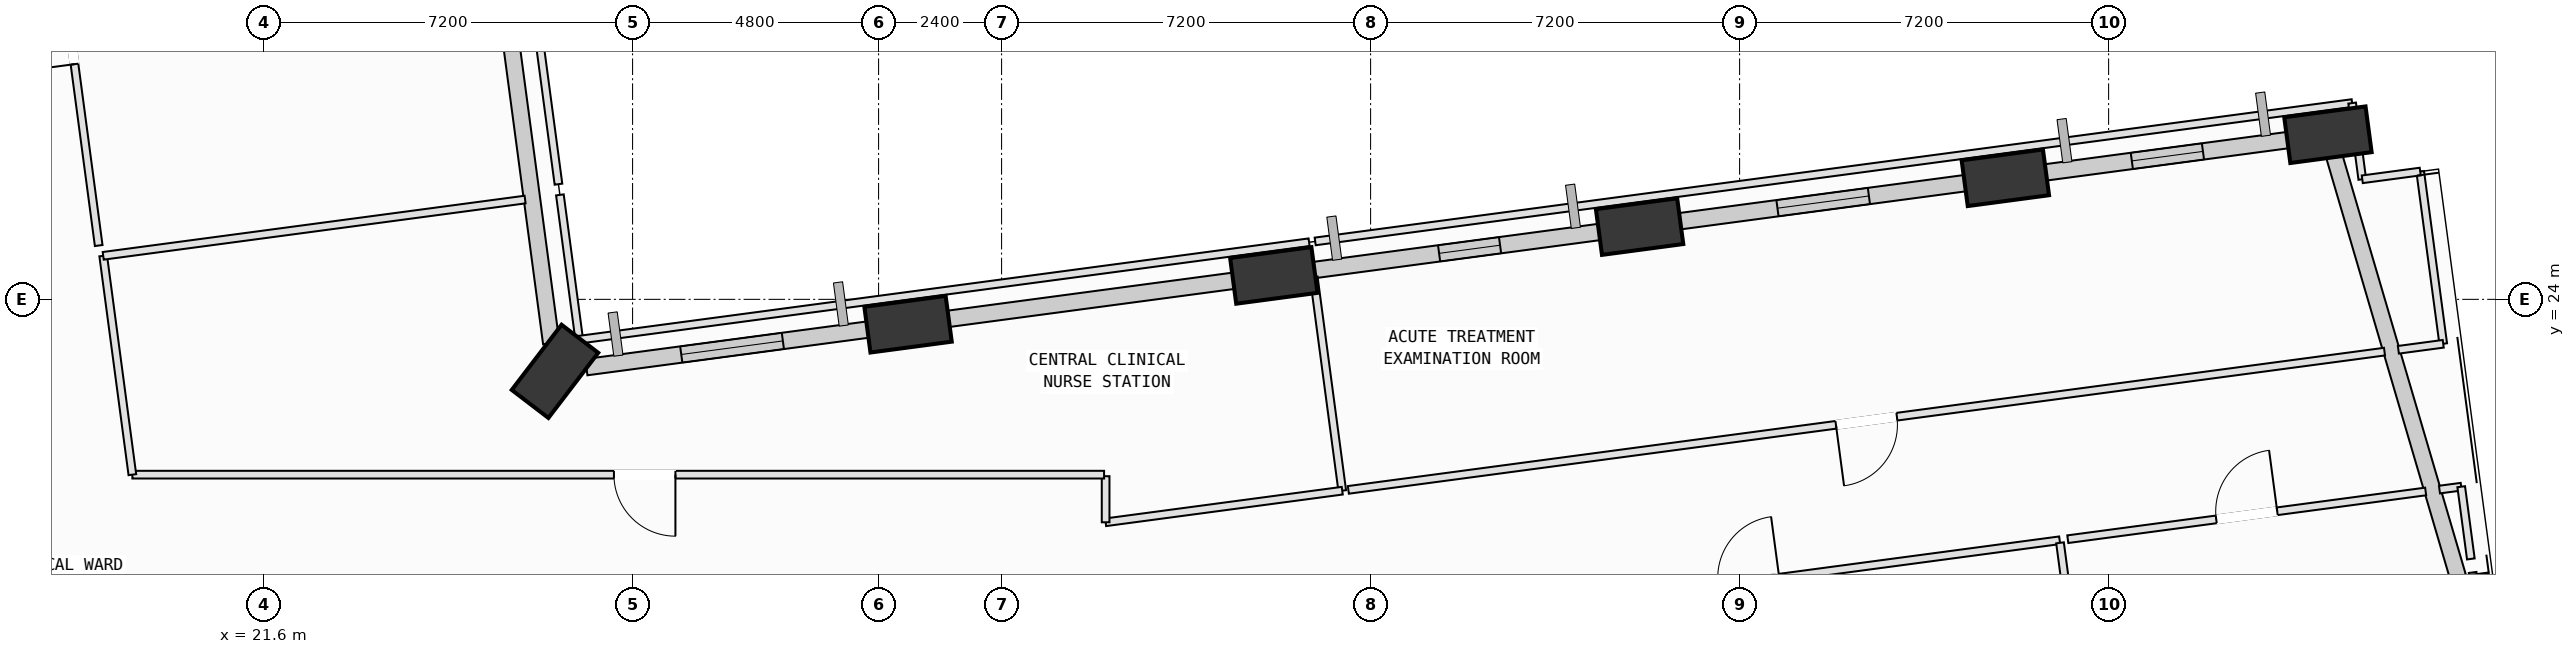
"""IFC4 building model, lengths in metres.
Left out: names, types, materials, properties, quantities, classifications, styles, units other than length and angle.
Written with IfcOpenShell. Run it as: python <this file> out.ifc"""

import sys

from ifc_helpers import new_model, si_unit, direction, frame, frame_2d, origin, origin_2d, place, context, subcontext, project, spatial, rectangle, extrude, element, fill, save


model = new_model("IFC4")
c1 = context("Model", 3, precision=1e-05, world=origin(), true_north=direction((0.0, 1.0)))
c2 = subcontext(c1, "Body", "Model", "MODEL_VIEW")
j1 = project(units=[si_unit("LENGTHUNIT", "METRE"), si_unit("PLANEANGLEUNIT", "RADIAN")], contexts=[c1])
p1 = place(None, origin())
s1 = spatial("IfcSite", under=j1, at=p1, CompositionType="ELEMENT")
p2 = place(p1, origin())
s2 = spatial("IfcBuilding", under=s1, at=p2, CompositionType="ELEMENT")
p3 = place(p2, frame((0.0, 0.0, 55.0)))
s3 = spatial("IfcBuildingStorey", under=s2, at=p3, CompositionType="ELEMENT", Elevation=55.0)
p4 = place(p3, frame((64.649, 17.795, 0.002), z_axis=(0.027737563791, 0.127847155378, 0.991405937251), x_axis=(-0.079107913013, -0.988396190327, 0.129672314108)))
e1 = element("IfcColumn", 1, at=p4, inside=s3, PredefinedType="COLUMN", context=c2, shape_type="SweptSolid", body=[
    extrude(rectangle(XDim=1.6, YDim=0.9, at=origin_2d()), origin(), (0.0, 0.0, 1.0), 4.031),
])
p5 = place(p3, frame((61.879, 27.211, 0.002), z_axis=(-0.01085970606, 0.11636266046, 0.993147420092), x_axis=(-0.974721493015, -0.222888100092, 0.015456580863)))
e2 = element("IfcColumn", 2, at=p5, inside=s3, PredefinedType="COLUMN", context=c2, shape_type="SweptSolid", body=[
    extrude(rectangle(XDim=1.6, YDim=0.9, at=origin_2d()), origin(), (0.0, 0.0, 1.0), 4.024),
])
p6 = place(p3, frame((55.585, 26.372, 0.002), z_axis=(-0.007239239153, 0.090703408213, 0.995851638124), x_axis=(-0.977594963145, -0.21015057651, 0.012034252227)))
e3 = element("IfcColumn", 3, at=p6, inside=s3, PredefinedType="COLUMN", context=c2, shape_type="SweptSolid", body=[
    extrude(rectangle(XDim=1.6, YDim=0.9, at=origin_2d()), origin(), (0.0, 0.0, 1.0), 4.013),
])
p7 = place(p3, frame((48.448, 25.419, 0.002), z_axis=(-0.003048590926, 0.061398621247, 0.998108669135), x_axis=(-0.98344957441, -0.180999535302, 0.008130363673)))
e4 = element("IfcColumn", 4, at=p7, inside=s3, PredefinedType="COLUMN", context=c2, shape_type="SweptSolid", body=[
    extrude(rectangle(XDim=1.6, YDim=0.9, at=origin_2d()), origin(), (0.0, 0.0, 1.0), 4.004),
])
p8 = place(p3, frame((41.312, 24.467, 0.002), z_axis=(0.001099008832, 0.03199336823, 0.999487476945), x_axis=(-0.995169392808, -0.098081366019, 0.004233823144)))
e5 = element("IfcColumn", 5, at=p8, inside=s3, PredefinedType="COLUMN", context=c2, shape_type="SweptSolid", body=[
    extrude(rectangle(XDim=1.6, YDim=0.9, at=origin_2d()), origin(), (0.0, 0.0, 1.0), 3.999),
])
p9 = place(p3, frame((34.175, 23.515, 0.002), z_axis=(0.005314508959, 0.002443452395, 0.999982892621), x_axis=(-0.534225748842, 0.845341499516, 0.000773609051)))
e6 = element("IfcColumn", 6, at=p9, inside=s3, PredefinedType="COLUMN", context=c2, shape_type="SweptSolid", body=[
    extrude(rectangle(XDim=1.6, YDim=0.9, at=origin_2d()), origin(), (0.0, 0.0, 1.0), 3.997),
])
p10 = place(p3, frame((27.286, 22.595, 0.002), z_axis=(0.009342779553, -0.026074293262, 0.999616348256), x_axis=(0.303914659334, 0.952445133146, 0.022003367683)))
e7 = element("IfcColumn", 7, at=p10, inside=s3, PredefinedType="COLUMN", context=c2, shape_type="SweptSolid", body=[
    extrude(rectangle(XDim=1.6, YDim=0.9, at=origin_2d()), origin(), (0.0, 0.0, 1.0), 3.998),
])
p11 = place(p3, frame((61.985, 26.851, 0.0), z_axis=(0.0, 0.0, 1.0), x_axis=(0.282177065207, -0.959362342325, 0.0)))
e8 = element("IfcWall", 8, at=p11, inside=s3, PredefinedType="SOLIDWALL", context=c2, shape_type="SweptSolid", body=[
    extrude(rectangle(XDim=8.614, YDim=0.32, at=frame_2d((4.307, 0.0))), origin(), (0.0, 0.0, 1.0), 3.165),
])
p12 = place(p3, frame((56.17, 26.449, 0.0), z_axis=(0.0, 0.0, 1.0), x_axis=(0.991214797288, 0.132261958388, 0.0)))
e9 = element("IfcWall", 9, at=p12, inside=s3, PredefinedType="SOLIDWALL", context=c2, shape_type="SweptSolid", body=[
    extrude(rectangle(XDim=5.209, YDim=0.32, at=frame_2d((2.604, 0.0))), origin(), (0.0, 0.0, 1.0), 3.165),
])
p13 = place(p12, frame((1.9, 0.0, 0.75)))
e10 = element("IfcOpeningElement", 10, at=p13, cuts=e9, PredefinedType="OPENING", context=c2, shape_type="SweptSolid", body=[
    extrude(rectangle(XDim=1.4, YDim=1.85, at=frame_2d((0.7, 0.925))), frame((0.0, 0.17, 0.0), z_axis=(0.0, -1.0, 0.0), x_axis=(1.0, 0.0, 0.0)), (0.0, 0.0, 1.0), 0.34),
])
p14 = place(p3, frame((49.049, 25.499, 0.0), z_axis=(0.0, 0.0, 1.0), x_axis=(0.991213029166, 0.132275208602, 0.0)))
e11 = element("IfcWall", 11, at=p14, inside=s3, PredefinedType="SOLIDWALL", context=c2, shape_type="SweptSolid", body=[
    extrude(rectangle(XDim=6.024, YDim=0.32, at=frame_2d((3.012, 0.0))), origin(), (0.0, 0.0, 1.0), 3.165),
])
p15 = place(p14, frame((2.109, 0.0, 0.75)))
e12 = element("IfcOpeningElement", 12, at=p15, cuts=e11, PredefinedType="OPENING", context=c2, shape_type="SweptSolid", body=[
    extrude(rectangle(XDim=1.8, YDim=2.05, at=frame_2d((0.9, 1.025))), frame((0.0, 0.17, 0.0), z_axis=(0.0, -1.0, 0.0), x_axis=(1.0, 0.0, 0.0)), (0.0, 0.0, 1.0), 0.34),
])
p16 = place(p3, frame((41.922, 24.548, 0.0), z_axis=(0.0, 0.0, 1.0), x_axis=(0.991215812837, 0.132254347308, 0.0)))
e13 = element("IfcWall", 13, at=p16, inside=s3, PredefinedType="SOLIDWALL", context=c2, shape_type="SweptSolid", body=[
    extrude(rectangle(XDim=6.0, YDim=0.32, at=frame_2d((3.0, 0.0))), origin(), (0.0, 0.0, 1.0), 3.165),
])
p17 = place(p16, frame((2.638, 0.0, 0.75)))
e14 = element("IfcOpeningElement", 14, at=p17, cuts=e13, PredefinedType="OPENING", context=c2, shape_type="SweptSolid", body=[
    extrude(rectangle(XDim=1.2, YDim=1.75, at=frame_2d((0.6, 0.875))), frame((0.0, 0.17, 0.0), z_axis=(0.0, -1.0, 0.0), x_axis=(1.0, 0.0, 0.0)), (0.0, 0.0, 1.0), 0.34),
])
p18 = place(p3, frame((34.789, 23.597, 0.0), z_axis=(0.0, 0.0, 1.0), x_axis=(0.99121756975, 0.132241178982, 0.0)))
e15 = element("IfcWall", 15, at=p18, inside=s3, PredefinedType="SOLIDWALL", context=c2, shape_type="SweptSolid", body=[
    extrude(rectangle(XDim=5.987, YDim=0.32, at=frame_2d((2.994, 0.0))), origin(), (0.0, 0.0, 1.0), 3.165),
])
p19 = place(p3, frame((27.898, 22.677, 0.0), z_axis=(0.0, 0.0, 1.0), x_axis=(0.991217861457, 0.132238992466, 0.0)))
e16 = element("IfcWall", 16, at=p19, inside=s3, PredefinedType="SOLIDWALL", context=c2, shape_type="SweptSolid", body=[
    extrude(rectangle(XDim=5.736, YDim=0.32, at=frame_2d((2.868, 0.0))), origin(), (0.0, 0.0, 1.0), 3.165),
])
p20 = place(p19, frame((1.869, 0.0, 0.75)))
e17 = element("IfcOpeningElement", 17, at=p20, cuts=e16, PredefinedType="OPENING", context=c2, shape_type="SweptSolid", body=[
    extrude(rectangle(XDim=2.0, YDim=1.95, at=frame_2d((1.0, 0.975))), frame((0.0, 0.17, 0.0), z_axis=(0.0, -1.0, 0.0), x_axis=(1.0, 0.0, 0.0)), (0.0, 0.0, 1.0), 0.34),
])
p21 = place(p3, frame((27.213, 23.144, 0.0), z_axis=(0.0, 0.0, 1.0), x_axis=(-0.132264032009, 0.991214520594, 0.0)))
e18 = element("IfcWall", 18, at=p21, inside=s3, PredefinedType="SOLIDWALL", context=c2, shape_type="SweptSolid", body=[
    extrude(rectangle(XDim=6.536, YDim=0.32, at=frame_2d((3.268, 0.0))), origin(), (0.0, 0.0, 1.0), 3.165),
])
p22 = place(p3, frame((44.512, 17.681, 0.0), z_axis=(0.0, 0.0, 1.0), x_axis=(0.991212913697, 0.13227607388, 0.0)))
e19 = element("IfcWall", 19, at=p22, inside=s3, PredefinedType="PARTITIONING", context=c2, shape_type="SweptSolid", body=[
    extrude(rectangle(XDim=12.241, YDim=0.15, at=frame_2d((6.12, 0.0))), origin(), (0.0, 0.0, 1.0), 3.78),
])
p23 = place(p22, frame((5.52, 0.0, 0.0)))
e20 = element("IfcOpeningElement", 20, at=p23, cuts=e19, PredefinedType="OPENING", context=c2, shape_type="SweptSolid", body=[
    extrude(rectangle(XDim=1.2, YDim=2.15, at=frame_2d((0.6, 1.075))), frame((0.0, 0.085, 0.0), z_axis=(0.0, -1.0, 0.0), x_axis=(1.0, 0.0, 0.0)), (0.0, 0.0, 1.0), 0.17),
])
p24 = place(p3, frame((56.652, 19.25, 0.0), z_axis=(0.0, 0.0, 1.0), x_axis=(0.132246241303, -0.991216894358, 0.0)))
e21 = element("IfcWall", 21, at=p24, inside=s3, PredefinedType="PARTITIONING", context=c2, shape_type="SweptSolid", body=[
    extrude(rectangle(XDim=13.565, YDim=0.15, at=frame_2d((6.783, 0.0))), origin(), (0.0, 0.0, 1.0), 3.78),
])
p25 = place(p3, frame((56.804, 19.321, 0.0), z_axis=(0.0, 0.0, 1.0), x_axis=(0.991228203394, 0.132161449736, 0.0)))
e22 = element("IfcWall", 22, at=p25, inside=s3, PredefinedType="PARTITIONING", context=c2, shape_type="SweptSolid", body=[
    extrude(rectangle(XDim=7.044, YDim=0.15, at=frame_2d((3.522, 0.0))), origin(), (0.0, 0.0, 1.0), 3.78),
])
p26 = place(p25, frame((2.922, 0.0, 0.0)))
e23 = element("IfcOpeningElement", 23, at=p26, cuts=e22, PredefinedType="OPENING", context=c2, shape_type="SweptSolid", body=[
    extrude(rectangle(XDim=1.2, YDim=2.15, at=frame_2d((0.6, 1.075))), frame((0.0, 0.085, 0.0), z_axis=(0.0, -1.0, 0.0), x_axis=(1.0, 0.0, 0.0)), (0.0, 0.0, 1.0), 0.17),
])
p27 = place(p3, frame((64.056, 20.289, 0.0), z_axis=(0.0, 0.0, 1.0), x_axis=(0.991421237805, 0.130705505733, 0.0)))
e24 = element("IfcWall", 24, at=p27, inside=s3, PredefinedType="PARTITIONING", context=c2, shape_type="SweptSolid", body=[
    extrude(rectangle(XDim=0.428, YDim=0.15, at=frame_2d((0.214, 0.0))), origin(), (0.0, 0.0, 1.0), 3.78),
])
p28 = place(p3, frame((64.48, 20.345, 0.0), z_axis=(0.0, 0.0, 1.0), x_axis=(0.132253723782, -0.991215896032, 0.0)))
e25 = element("IfcWall", 25, at=p28, inside=s3, PredefinedType="PARTITIONING", context=c2, shape_type="SweptSolid", body=[
    extrude(rectangle(XDim=1.421, YDim=0.15, at=frame_2d((0.711, 0.0))), origin(), (0.0, 0.0, 1.0), 3.165),
])
p29 = place(p3, frame((64.703, 18.672, 0.0), z_axis=(0.0, 0.0, 1.0), x_axis=(0.132532001564, -0.991178726851, 0.0)))
e26 = element("IfcWall", 26, at=p29, inside=s3, PredefinedType="PARTITIONING", context=c2, shape_type="SweptSolid", body=[
    extrude(rectangle(XDim=1.216, YDim=0.15, at=frame_2d((0.608, 0.0))), origin(), (0.0, 0.0, 1.0), 3.165),
])
p30 = place(p3, frame((42.091, 24.435, 0.0), z_axis=(0.0, 0.0, 1.0), x_axis=(0.132205554526, -0.991222321859, 0.0)))
e27 = element("IfcWall", 27, at=p30, inside=s3, PredefinedType="PARTITIONING", context=c2, shape_type="SweptSolid", body=[
    extrude(rectangle(XDim=4.205, YDim=0.15, at=frame_2d((2.103, 0.0))), origin(), (0.0, 0.0, 1.0), 3.78),
])
p31 = place(p3, frame((42.647, 20.267, 0.0), z_axis=(0.0, 0.0, 1.0), x_axis=(-0.991210496894, -0.132294182971, 0.0)))
e28 = element("IfcWall", 28, at=p31, inside=s3, PredefinedType="PARTITIONING", context=c2, shape_type="SweptSolid", body=[
    extrude(rectangle(XDim=4.658, YDim=0.15, at=frame_2d((2.329, 0.0))), origin(), (0.0, 0.0, 1.0), 3.78),
])
p32 = place(p3, frame((38.03, 19.651, 0.0), z_axis=(0.0, 0.0, 1.0), x_axis=(0.0, 1.0, 0.0)))
e29 = element("IfcWall", 29, at=p32, inside=s3, PredefinedType="PARTITIONING", context=c2, shape_type="SweptSolid", body=[
    extrude(rectangle(XDim=0.899, YDim=0.15, at=frame_2d((0.45, 0.0))), origin(), (0.0, 0.0, 1.0), 3.78),
])
p33 = place(p3, frame((38.0, 20.58, 0.0), z_axis=(0.0, 0.0, 1.0), x_axis=(-1.0, 0.0, 0.0)))
e30 = element("IfcWall", 30, at=p33, inside=s3, PredefinedType="PARTITIONING", context=c2, shape_type="SweptSolid", body=[
    extrude(rectangle(XDim=18.96, YDim=0.15, at=frame_2d((9.48, 0.0))), origin(), (0.0, 0.0, 1.0), 3.365),
])
p34 = place(p33, frame((8.364, 0.0, 0.0)))
e31 = element("IfcOpeningElement", 31, at=p34, cuts=e30, PredefinedType="OPENING", context=c2, shape_type="SweptSolid", body=[
    extrude(rectangle(XDim=1.2, YDim=2.15, at=frame_2d((0.6, 1.075))), frame((0.0, 0.085, 0.0), z_axis=(0.0, -1.0, 0.0), x_axis=(1.0, 0.0, 0.0)), (0.0, 0.0, 1.0), 0.17),
])
p35 = place(p3, frame((19.04, 20.58, 0.0), z_axis=(0.0, 0.0, 1.0), x_axis=(-0.132137728125, 0.991231365931, 0.0)))
e32 = element("IfcWall", 32, at=p35, inside=s3, PredefinedType="PARTITIONING", context=c2, shape_type="SweptSolid", body=[
    extrude(rectangle(XDim=4.307, YDim=0.15, at=frame_2d((2.153, 0.0))), origin(), (0.0, 0.0, 1.0), 3.78),
])
p36 = place(p3, frame((18.471, 24.849, 0.0), z_axis=(0.0, 0.0, 1.0), x_axis=(0.991223021829, 0.13220030634, 0.0)))
e33 = element("IfcWall", 33, at=p36, inside=s3, PredefinedType="PARTITIONING", context=c2, shape_type="SweptSolid", body=[
    extrude(rectangle(XDim=8.305, YDim=0.15, at=frame_2d((4.152, 0.0))), origin(), (0.0, 0.0, 1.0), 3.78),
])
p37 = place(p3, frame((27.382, 26.038, 0.0), z_axis=(0.0, 0.0, 1.0), x_axis=(0.132253490455, -0.991215927163, 0.0)))
e34 = element("IfcWall", 34, at=p37, inside=s3, PredefinedType="PARTITIONING", context=c2, shape_type="SweptSolid", body=[
    extrude(rectangle(XDim=2.85, YDim=0.15, at=frame_2d((1.425, 0.0))), origin(), (0.0, 0.0, 1.0), 3.78),
])
p38 = place(p3, frame((27.759, 23.213, 0.0), z_axis=(0.0, 0.0, 1.0), x_axis=(0.991206665462, 0.132322886697, 0.0)))
e35 = element("IfcWall", 35, at=p38, inside=s3, PredefinedType="PARTITIONING", context=c2, shape_type="SweptSolid", body=[
    extrude(rectangle(XDim=14.367, YDim=0.15, at=frame_2d((7.184, 0.0))), origin(), (0.0, 0.0, 1.0), 3.165),
])
p39 = place(p3, frame((63.68, 26.493, 0.0), z_axis=(0.0, 0.0, 1.0), x_axis=(0.132451494612, -0.991189488229, 0.0)))
e36 = element("IfcWall", 36, at=p39, inside=s3, PredefinedType="PARTITIONING", context=c2, shape_type="SweptSolid", body=[
    extrude(rectangle(XDim=3.39, YDim=0.15, at=frame_2d((1.695, 0.0))), origin(), (0.0, 0.0, 1.0), 3.78),
])
p40 = place(p3, frame((64.129, 23.133, 0.0), z_axis=(0.0, 0.0, 1.0), x_axis=(-0.99118679171, -0.132471672218, 0.0)))
e37 = element("IfcWall", 37, at=p40, inside=s3, PredefinedType="PARTITIONING", context=c2, shape_type="SweptSolid", body=[
    extrude(rectangle(XDim=0.883, YDim=0.15, at=frame_2d((0.441, 0.0))), origin(), (0.0, 0.0, 1.0), 3.78),
])
p41 = place(p3, frame((62.983, 22.98, 0.0), z_axis=(0.0, 0.0, 1.0), x_axis=(-0.99121859397, -0.132233501686, 0.0)))
e38 = element("IfcWall", 38, at=p41, inside=s3, PredefinedType="PARTITIONING", context=c2, shape_type="SweptSolid", body=[
    extrude(rectangle(XDim=20.396, YDim=0.15, at=frame_2d((10.198, 0.0))), origin(), (0.0, 0.0, 1.0), 3.78),
])
p42 = place(p41, frame((9.598, 0.0, 0.0)))
e39 = element("IfcOpeningElement", 39, at=p42, cuts=e38, PredefinedType="OPENING", context=c2, shape_type="SweptSolid", body=[
    extrude(rectangle(XDim=1.2, YDim=2.15, at=frame_2d((0.6, 1.075))), frame((0.0, 0.085, 0.0), z_axis=(0.0, -1.0, 0.0), x_axis=(1.0, 0.0, 0.0)), (0.0, 0.0, 1.0), 0.17),
])
p43 = place(p3, frame((42.119, 25.13, 0.0), z_axis=(0.0, 0.0, 1.0), x_axis=(0.991218496984, 0.13223422869, 0.0)))
e40 = element("IfcWall", 40, at=p43, inside=s3, PredefinedType="PARTITIONING", context=c2, shape_type="SweptSolid", body=[
    extrude(rectangle(XDim=20.412, YDim=0.15, at=frame_2d((10.206, 0.0))), origin(), (0.0, 0.0, 1.0), 3.165),
])
p44 = place(p3, frame((62.352, 27.829, 0.0), z_axis=(0.0, 0.0, 1.0), x_axis=(0.131982500357, -0.991252046454, 0.0)))
e41 = element("IfcWall", 41, at=p44, inside=s3, PredefinedType="PARTITIONING", context=c2, shape_type="SweptSolid", body=[
    extrude(rectangle(XDim=1.5, YDim=0.15, at=frame_2d((0.75, 0.0))), origin(), (0.0, 0.0, 1.0), 3.165),
])
p45 = place(p3, frame((62.55, 26.342, 0.0), z_axis=(0.0, 0.0, 1.0), x_axis=(0.991201693894, 0.132360122478, 0.0)))
e42 = element("IfcWall", 42, at=p45, inside=s3, PredefinedType="PARTITIONING", context=c2, shape_type="SweptSolid", body=[
    extrude(rectangle(XDim=1.14, YDim=0.15, at=frame_2d((0.57, 0.0))), origin(), (0.0, 0.0, 1.0), 3.78),
])
p46 = place(p3, frame((18.383, 25.05, 0.0), z_axis=(0.0, 0.0, 1.0), x_axis=(-0.132271109001, 0.991213576241, 0.0)))
e43 = element("IfcWall", 43, at=p46, inside=s3, PredefinedType="PARTITIONING", context=c2, shape_type="SweptSolid", body=[
    extrude(rectangle(XDim=8.339, YDim=0.15, at=frame_2d((4.169, 0.0))), origin(), (0.0, 0.0, 1.0), 3.78),
])
p47 = place(p46, frame((3.57, 0.0, 0.0)))
e44 = element("IfcOpeningElement", 44, at=p47, cuts=e43, PredefinedType="OPENING", context=c2, shape_type="SweptSolid", body=[
    extrude(rectangle(XDim=1.2, YDim=2.15, at=frame_2d((0.6, 1.075))), frame((0.0, 0.085, 0.0), z_axis=(0.0, -1.0, 0.0), x_axis=(1.0, 0.0, 0.0)), (0.0, 0.0, 1.0), 0.17),
])
p48 = place(p3, frame((26.251, 34.513, 0.0), z_axis=(0.0, 0.0, 1.0), x_axis=(0.132271109001, -0.991213576241, 0.0)))
e45 = element("IfcWall", 45, at=p48, inside=s3, PredefinedType="PARTITIONING", context=c2, shape_type="SweptSolid", body=[
    extrude(rectangle(XDim=8.339, YDim=0.15, at=frame_2d((4.169, 0.0))), origin(), (0.0, 0.0, 1.0), 3.78),
])
p49 = place(p13, origin())
e46 = element("IfcWindow", 46, at=p49, inside=s3, PartitioningType="SINGLE_PANEL", PredefinedType="WINDOW", context=c2, shape_type="SweptSolid", body=[
    extrude(rectangle(XDim=1.4, YDim=1.85, at=frame_2d((0.7, 0.925))), frame((0.0, 0.03, 0.0), z_axis=(0.0, -1.0, 0.0), x_axis=(1.0, 0.0, 0.0)), (0.0, 0.0, 1.0), 0.06),
])
fill(e10, e46)
p50 = place(p15, origin())
e47 = element("IfcWindow", 47, at=p50, inside=s3, PartitioningType="SINGLE_PANEL", PredefinedType="WINDOW", context=c2, shape_type="SweptSolid", body=[
    extrude(rectangle(XDim=1.8, YDim=2.05, at=frame_2d((0.9, 1.025))), frame((0.0, 0.03, 0.0), z_axis=(0.0, -1.0, 0.0), x_axis=(1.0, 0.0, 0.0)), (0.0, 0.0, 1.0), 0.06),
])
fill(e12, e47)
p51 = place(p17, origin())
e48 = element("IfcWindow", 48, at=p51, inside=s3, PartitioningType="SINGLE_PANEL", PredefinedType="WINDOW", context=c2, shape_type="SweptSolid", body=[
    extrude(rectangle(XDim=1.2, YDim=1.75, at=frame_2d((0.6, 0.875))), frame((0.0, 0.03, 0.0), z_axis=(0.0, -1.0, 0.0), x_axis=(1.0, 0.0, 0.0)), (0.0, 0.0, 1.0), 0.06),
])
fill(e14, e48)
p52 = place(p20, origin())
e49 = element("IfcWindow", 49, at=p52, inside=s3, PartitioningType="SINGLE_PANEL", PredefinedType="WINDOW", context=c2, shape_type="SweptSolid", body=[
    extrude(rectangle(XDim=2.0, YDim=1.95, at=frame_2d((1.0, 0.975))), frame((0.0, 0.03, 0.0), z_axis=(0.0, -1.0, 0.0), x_axis=(1.0, 0.0, 0.0)), (0.0, 0.0, 1.0), 0.06),
])
fill(e17, e49)
p53 = place(p26, origin())
e50 = element("IfcDoor", 50, at=p53, inside=s3, OperationType="SINGLE_SWING_RIGHT", PredefinedType="DOOR", context=c2, shape_type="SweptSolid", body=[
    extrude(rectangle(XDim=1.2, YDim=2.15, at=frame_2d((0.6, 1.075))), frame((0.0, 0.025, 0.0), z_axis=(0.0, -1.0, 0.0), x_axis=(1.0, 0.0, 0.0)), (0.0, 0.0, 1.0), 0.05),
])
fill(e23, e50)
p54 = place(p34, origin())
e51 = element("IfcDoor", 51, at=p54, inside=s3, OperationType="SINGLE_SWING_LEFT", PredefinedType="DOOR", context=c2, shape_type="SweptSolid", body=[
    extrude(rectangle(XDim=1.2, YDim=2.15, at=frame_2d((0.6, 1.075))), frame((0.0, 0.025, 0.0), z_axis=(0.0, -1.0, 0.0), x_axis=(1.0, 0.0, 0.0)), (0.0, 0.0, 1.0), 0.05),
])
fill(e31, e51)
p55 = place(p42, origin())
e52 = element("IfcDoor", 52, at=p55, inside=s3, OperationType="SINGLE_SWING_RIGHT", PredefinedType="DOOR", context=c2, shape_type="SweptSolid", body=[
    extrude(rectangle(XDim=1.2, YDim=2.15, at=frame_2d((0.6, 1.075))), frame((0.0, 0.025, 0.0), z_axis=(0.0, -1.0, 0.0), x_axis=(1.0, 0.0, 0.0)), (0.0, 0.0, 1.0), 0.05),
])
fill(e39, e52)
p56 = place(p47, origin())
e53 = element("IfcDoor", 53, at=p56, inside=s3, OperationType="SINGLE_SWING_LEFT", PredefinedType="DOOR", context=c2, shape_type="SweptSolid", body=[
    extrude(rectangle(XDim=1.2, YDim=2.15, at=frame_2d((0.6, 1.075))), frame((0.0, 0.025, 0.0), z_axis=(0.0, -1.0, 0.0), x_axis=(1.0, 0.0, 0.0)), (0.0, 0.0, 1.0), 0.05),
])
fill(e44, e53)
save(model, sys.argv[1])
